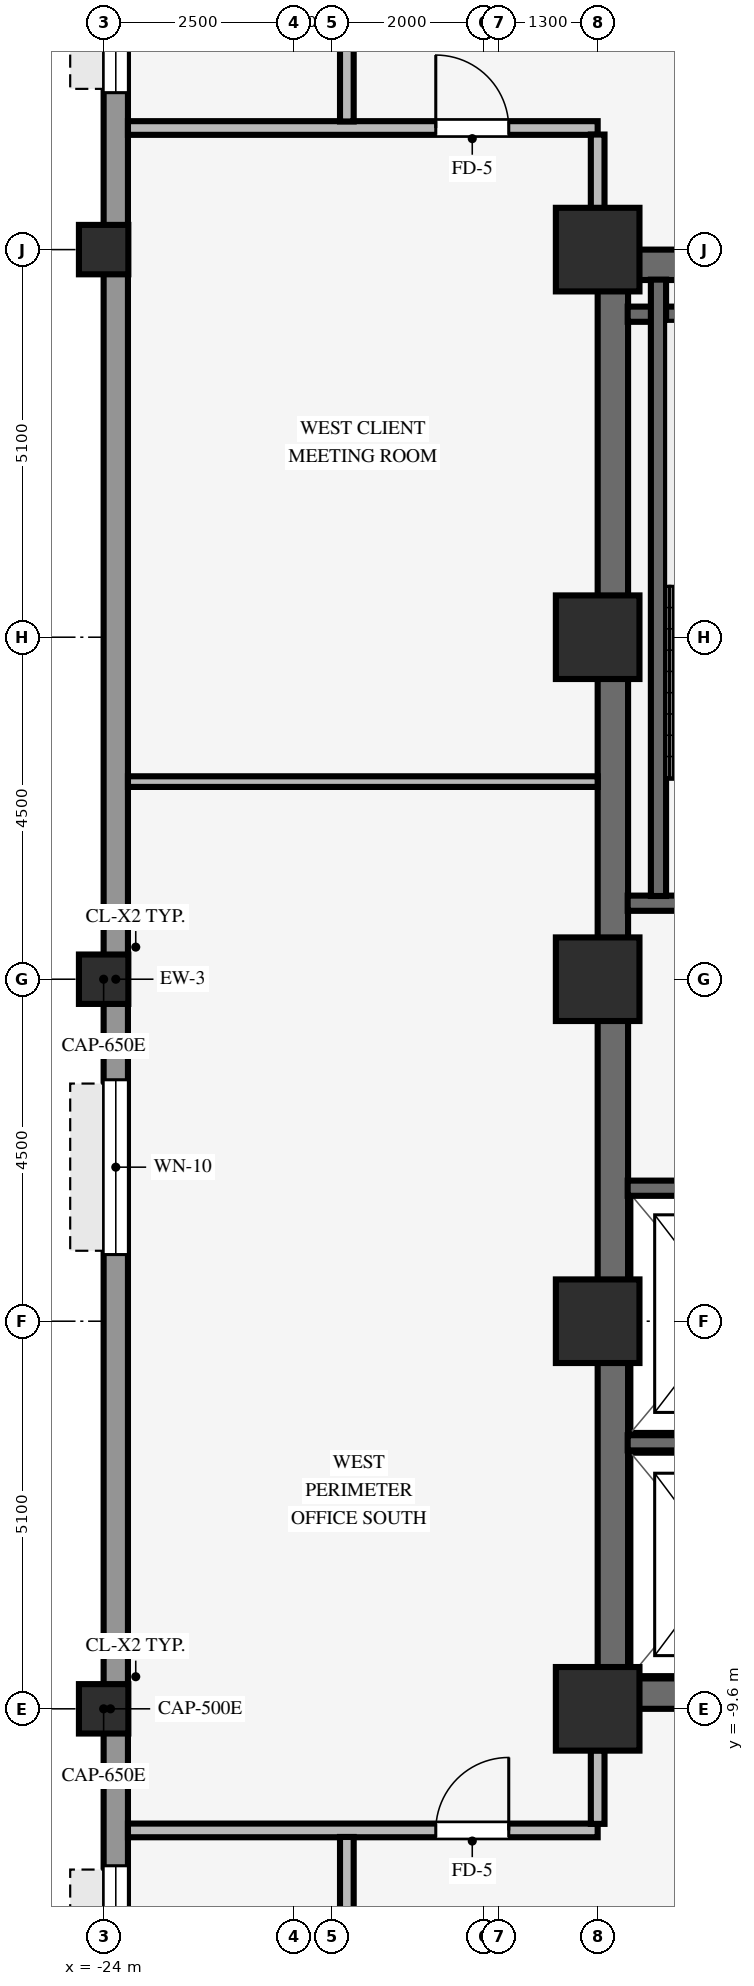
"""IFC4 building model, lengths in metres.
Left out: names, types, materials, properties, quantities, classifications, styles, units other than length and angle.
Written with IfcOpenShell. Run it as: python <this file> out.ifc"""

import sys

from ifc_helpers import new_model, si_unit, direction, frame, frame_2d, origin, origin_2d, place, context, subcontext, project, spatial, rectangle, hollow_rectangle, extrude, source, transform, mapped, element, fill, save


model = new_model("IFC4")
c1 = context("Model", 3, precision=1e-05, world=origin(), true_north=direction((0.0, 1.0)))
c2 = subcontext(c1, "Body", "Model", "MODEL_VIEW")
j1 = project(units=[si_unit("LENGTHUNIT", "METRE"), si_unit("PLANEANGLEUNIT", "RADIAN")], contexts=[c1])
p1 = place(None, origin())
s1 = spatial("IfcSite", under=j1, at=p1, CompositionType="ELEMENT")
p2 = place(p1, origin())
s2 = spatial("IfcBuilding", under=s1, at=p2, CompositionType="ELEMENT")
p3 = place(p2, frame((0.0, 0.0, 112.9)))
s3 = spatial("IfcBuildingStorey", under=s2, at=p3, CompositionType="ELEMENT", Elevation=112.9)
for number, where, z_axis, x_axis in (
    (1, (-17.5, -9.4, 0.0), (0.0, 0.0, 1.0), (1.0, 0.0, 0.0)),
    (2, (-17.5, 9.4, 0.0), (0.0, 0.0, 1.0), (1.0, 0.0, 0.0)),
):
    element("IfcWall", number, at=place(p3, frame(where, z_axis=z_axis, x_axis=x_axis)), inside=s3, PredefinedType="SHEAR", context=c2, shape_type="SweptSolid", body=[
        extrude(rectangle(XDim=8.5, YDim=0.4, at=frame_2d((4.25, 0.0))), origin(), (0.0, 0.0, 1.0), 3.25),
    ])
p4 = place(p3, frame((-17.3, -9.205, 0.0), z_axis=(0.0, 0.0, 1.0), x_axis=(0.0, 1.0, 0.0)))
e3 = element("IfcWall", 3, at=p4, inside=s3, PredefinedType="SHEAR", context=c2, shape_type="SweptSolid", body=[
    extrude(rectangle(XDim=18.41, YDim=0.4, at=frame_2d((9.205, 0.0))), origin(), (0.0, 0.0, 1.0), 3.25),
])
for number, where, z_axis, x_axis in (
    (4, (-17.5, -9.6, 0.0), (0.0, 0.0, 1.0), (1.0, 0.0, 0.0)),
    (5, (-17.5, -4.5, 0.0), (0.0, 0.0, 1.0), (1.0, 0.0, 0.0)),
    (6, (-17.5, 4.5, 0.0), (0.0, 0.0, 1.0), (1.0, 0.0, 0.0)),
    (7, (-17.5, 9.6, 0.0), (0.0, 0.0, 1.0), (1.0, 0.0, 0.0)),
    (8, (-17.5, 0.0, 0.0), (0.0, 0.0, 1.0), (1.0, 0.0, 0.0)),
):
    element("IfcColumn", number, at=place(p3, frame(where, z_axis=z_axis, x_axis=x_axis)), inside=s3, PredefinedType="COLUMN", context=c2, shape_type="SweptSolid", body=[
        extrude(rectangle(XDim=1.1, YDim=1.1, at=origin_2d()), origin(), (0.0, 0.0, 1.0), 3.25),
    ])
for number, where, z_axis, x_axis in (
    (9, (-24.0, -9.6, 0.0), (0.0, 0.0, 1.0), (1.0, 0.0, 0.0)),
    (10, (-24.0, 0.0, 0.0), (0.0, 0.0, 1.0), (1.0, 0.0, 0.0)),
    (11, (-24.0, 9.6, 0.0), (0.0, 0.0, 1.0), (1.0, 0.0, 0.0)),
):
    element("IfcColumn", number, at=place(p3, frame(where, z_axis=z_axis, x_axis=x_axis)), inside=s3, PredefinedType="COLUMN", context=c2, shape_type="SweptSolid", body=[
        extrude(hollow_rectangle(XDim=0.65, YDim=0.65, WallThickness=0.04, InnerFilletRadius=0.04, OuterFilletRadius=0.08, at=origin_2d()), origin(), (0.0, 0.0, 1.0), 3.25),
    ])
p5 = place(p3, frame((-23.84, -20.784, 0.0), z_axis=(0.0, 0.0, 1.0), x_axis=(0.0, 1.0, 0.0)))
e12 = element("IfcWall", 12, at=p5, inside=s3, PredefinedType="STANDARD", context=c2, shape_type="SweptSolid", body=[
    extrude(rectangle(XDim=41.568, YDim=0.32, at=frame_2d((20.784, 0.0))), origin(), (0.0, 0.0, 1.0), 3.24),
])
p6 = place(p5, frame((6.819, 0.0, 0.8)))
e13 = element("IfcOpeningElement", 13, at=p6, cuts=e12, PredefinedType="OPENING", context=c2, shape_type="SweptSolid", body=[
    extrude(rectangle(XDim=2.3, YDim=1.62, at=frame_2d((1.15, 0.81))), frame((0.0, 0.17, 0.0), z_axis=(0.0, -1.0, 0.0), x_axis=(1.0, 0.0, 0.0)), (0.0, 0.0, 1.0), 0.34),
])
p7 = place(p5, frame((17.161, 0.0, 0.8)))
e14 = element("IfcOpeningElement", 14, at=p7, cuts=e12, PredefinedType="OPENING", context=c2, shape_type="SweptSolid", body=[
    extrude(rectangle(XDim=2.3, YDim=1.62, at=frame_2d((1.15, 0.81))), frame((0.0, 0.17, 0.0), z_axis=(0.0, -1.0, 0.0), x_axis=(1.0, 0.0, 0.0)), (0.0, 0.0, 1.0), 0.34),
])
p8 = place(p5, frame((32.449, 0.0, 0.8)))
e15 = element("IfcOpeningElement", 15, at=p8, cuts=e12, PredefinedType="OPENING", context=c2, shape_type="SweptSolid", body=[
    extrude(rectangle(XDim=2.3, YDim=1.62, at=frame_2d((1.15, 0.81))), frame((0.0, 0.17, 0.0), z_axis=(0.0, -1.0, 0.0), x_axis=(1.0, 0.0, 0.0)), (0.0, 0.0, 1.0), 0.34),
])
for number, where, z_axis, x_axis in (
    (16, (-17.105, 1.0, 0.0), (0.0, 0.0, 1.0), (1.0, 0.0, 0.0)),
    (17, (-17.105, 8.75, 0.0), (0.0, 0.0, 1.0), (1.0, 0.0, 0.0)),
):
    element("IfcWall", number, at=place(p3, frame(where, z_axis=z_axis, x_axis=x_axis)), inside=s3, PredefinedType="SHEAR", context=c2, shape_type="SweptSolid", body=[
        extrude(rectangle(XDim=3.57, YDim=0.2, at=frame_2d((1.785, 0.0))), origin(), (0.0, 0.0, 1.0), 3.25),
    ])
p9 = place(p3, frame((-16.7, 1.095, 0.0), z_axis=(0.0, 0.0, 1.0), x_axis=(0.0, 1.0, 0.0)))
e18 = element("IfcWall", 18, at=p9, inside=s3, PredefinedType="SHEAR", context=c2, shape_type="SweptSolid", body=[
    extrude(rectangle(XDim=8.11, YDim=0.2, at=frame_2d((4.055, 0.0))), origin(), (0.0, 0.0, 1.0), 3.25),
])
p10 = place(p3, frame((-17.105, -6.1, 0.0), z_axis=(0.0, 0.0, 1.0), x_axis=(1.0, 0.0, 0.0)))
e19 = element("IfcWall", 19, at=p10, inside=s3, PredefinedType="SHEAR", context=c2, shape_type="SweptSolid", body=[
    extrude(rectangle(XDim=2.855, YDim=0.2, at=frame_2d((1.427, 0.0))), origin(), (0.0, 0.0, 1.0), 3.25),
])
p11 = place(p3, frame((-17.105, -2.75, 0.0), z_axis=(0.0, 0.0, 1.0), x_axis=(1.0, 0.0, 0.0)))
e20 = element("IfcWall", 20, at=p11, inside=s3, PredefinedType="SHEAR", context=c2, shape_type="SweptSolid", body=[
    extrude(rectangle(XDim=2.66, YDim=0.2, at=frame_2d((1.33, 0.0))), origin(), (0.0, 0.0, 1.0), 3.25),
])
p12 = place(p3, frame((-23.68, -11.2, 0.0), z_axis=(0.0, 0.0, 1.0), x_axis=(1.0, 0.0, 0.0)))
e21 = element("IfcWall", 21, at=p12, inside=s3, PredefinedType="PARTITIONING", context=c2, shape_type="SweptSolid", body=[
    extrude(rectangle(XDim=6.18, YDim=0.18, at=frame_2d((3.09, 0.0))), origin(), (0.0, 0.0, 1.0), 3.24),
])
p13 = place(p12, frame((4.05, 0.0, 0.0)))
e22 = element("IfcOpeningElement", 22, at=p13, cuts=e21, PredefinedType="OPENING", context=c2, shape_type="SweptSolid", body=[
    extrude(rectangle(XDim=0.96, YDim=2.1, at=frame_2d((0.48, 1.05))), frame((0.0, 0.1, 0.0), z_axis=(0.0, -1.0, 0.0), x_axis=(1.0, 0.0, 0.0)), (0.0, 0.0, 1.0), 0.2),
])
p14 = place(p3, frame((-23.68, 2.6, 0.0), z_axis=(0.0, 0.0, 1.0), x_axis=(1.0, 0.0, 0.0)))
e23 = element("IfcWall", 23, at=p14, inside=s3, PredefinedType="PARTITIONING", context=c2, shape_type="SweptSolid", body=[
    extrude(rectangle(XDim=6.18, YDim=0.14, at=frame_2d((3.09, 0.0))), origin(), (0.0, 0.0, 1.0), 3.24),
])
p15 = place(p3, frame((-23.68, 11.2, 0.0), z_axis=(0.0, 0.0, 1.0), x_axis=(1.0, 0.0, 0.0)))
e24 = element("IfcWall", 24, at=p15, inside=s3, PredefinedType="PARTITIONING", context=c2, shape_type="SweptSolid", body=[
    extrude(rectangle(XDim=6.18, YDim=0.18, at=frame_2d((3.09, 0.0))), origin(), (0.0, 0.0, 1.0), 3.24),
])
p16 = place(p15, frame((4.05, 0.0, 0.0)))
e25 = element("IfcOpeningElement", 25, at=p16, cuts=e24, PredefinedType="OPENING", context=c2, shape_type="SweptSolid", body=[
    extrude(rectangle(XDim=0.96, YDim=2.1, at=frame_2d((0.48, 1.05))), frame((0.0, 0.1, 0.0), z_axis=(0.0, -1.0, 0.0), x_axis=(1.0, 0.0, 0.0)), (0.0, 0.0, 1.0), 0.2),
])
for number, where, z_axis, x_axis in (
    (26, (-20.8, -13.514, 0.0), (0.0, 0.0, 1.0), (0.0, 1.0, 0.0)),
    (27, (-20.8, 11.286, 0.0), (0.0, 0.0, 1.0), (0.0, 1.0, 0.0)),
):
    element("IfcWall", number, at=place(p3, frame(where, z_axis=z_axis, x_axis=x_axis)), inside=s3, PredefinedType="PARTITIONING", context=c2, shape_type="SweptSolid", body=[
        extrude(rectangle(XDim=2.228, YDim=0.18, at=frame_2d((1.114, 0.0))), origin(), (0.0, 0.0, 1.0), 3.24),
    ])
for number, where, z_axis, x_axis in (
    (28, (-17.5, -11.114, 0.0), (0.0, 0.0, 1.0), (0.0, 1.0, 0.0)),
    (29, (-17.5, 10.146, 0.0), (0.0, 0.0, 1.0), (0.0, 1.0, 0.0)),
):
    element("IfcWall", number, at=place(p3, frame(where, z_axis=z_axis, x_axis=x_axis)), inside=s3, PredefinedType="PARTITIONING", context=c2, shape_type="SweptSolid", body=[
        extrude(rectangle(XDim=0.968, YDim=0.18, at=frame_2d((0.484, 0.0))), origin(), (0.0, 0.0, 1.0), 2.618),
    ])
m1 = source(origin(), c2, "Body", "SweptSolid", [
    extrude(rectangle(XDim=2.3, YDim=1.62, at=frame_2d((1.15, 0.81))), frame((0.0, 0.03, 0.0), z_axis=(0.0, -1.0, 0.0), x_axis=(1.0, 0.0, 0.0)), (0.0, 0.0, 1.0), 0.06),
])
p17 = place(p6, origin())
e30 = element("IfcWindow", 30, at=p17, inside=s3, PartitioningType="SINGLE_PANEL", PredefinedType="WINDOW", context=c2, shape_type="MappedRepresentation", body=[
    mapped(m1, transform((0.0, 0.0, 0.0), scale=1.0)),
])
fill(e13, e30)
p18 = place(p7, origin())
e31 = element("IfcWindow", 31, at=p18, inside=s3, PartitioningType="SINGLE_PANEL", PredefinedType="WINDOW", context=c2, shape_type="MappedRepresentation", body=[
    mapped(m1, transform((0.0, 0.0, 0.0), scale=1.0)),
])
fill(e14, e31)
p19 = place(p8, origin())
e32 = element("IfcWindow", 32, at=p19, inside=s3, PartitioningType="SINGLE_PANEL", PredefinedType="WINDOW", context=c2, shape_type="MappedRepresentation", body=[
    mapped(m1, transform((0.0, 0.0, 0.0), scale=1.0)),
])
fill(e15, e32)
m2 = source(origin(), c2, "Body", "SweptSolid", [
    extrude(rectangle(XDim=0.96, YDim=2.1, at=frame_2d((0.48, 1.05))), frame((0.0, 0.025, 0.0), z_axis=(0.0, -1.0, 0.0), x_axis=(1.0, 0.0, 0.0)), (0.0, 0.0, 1.0), 0.05),
])
p20 = place(p13, origin())
e33 = element("IfcDoor", 33, at=p20, inside=s3, OperationType="SINGLE_SWING_RIGHT", PredefinedType="DOOR", context=c2, shape_type="MappedRepresentation", body=[
    mapped(m2, transform((0.0, 0.0, 0.0), scale=1.0)),
])
fill(e22, e33)
p21 = place(p16, origin())
e34 = element("IfcDoor", 34, at=p21, inside=s3, OperationType="SINGLE_SWING_LEFT", PredefinedType="DOOR", context=c2, shape_type="MappedRepresentation", body=[
    mapped(m2, transform((0.0, 0.0, 0.0), scale=1.0)),
])
fill(e25, e34)
save(model, sys.argv[1])
